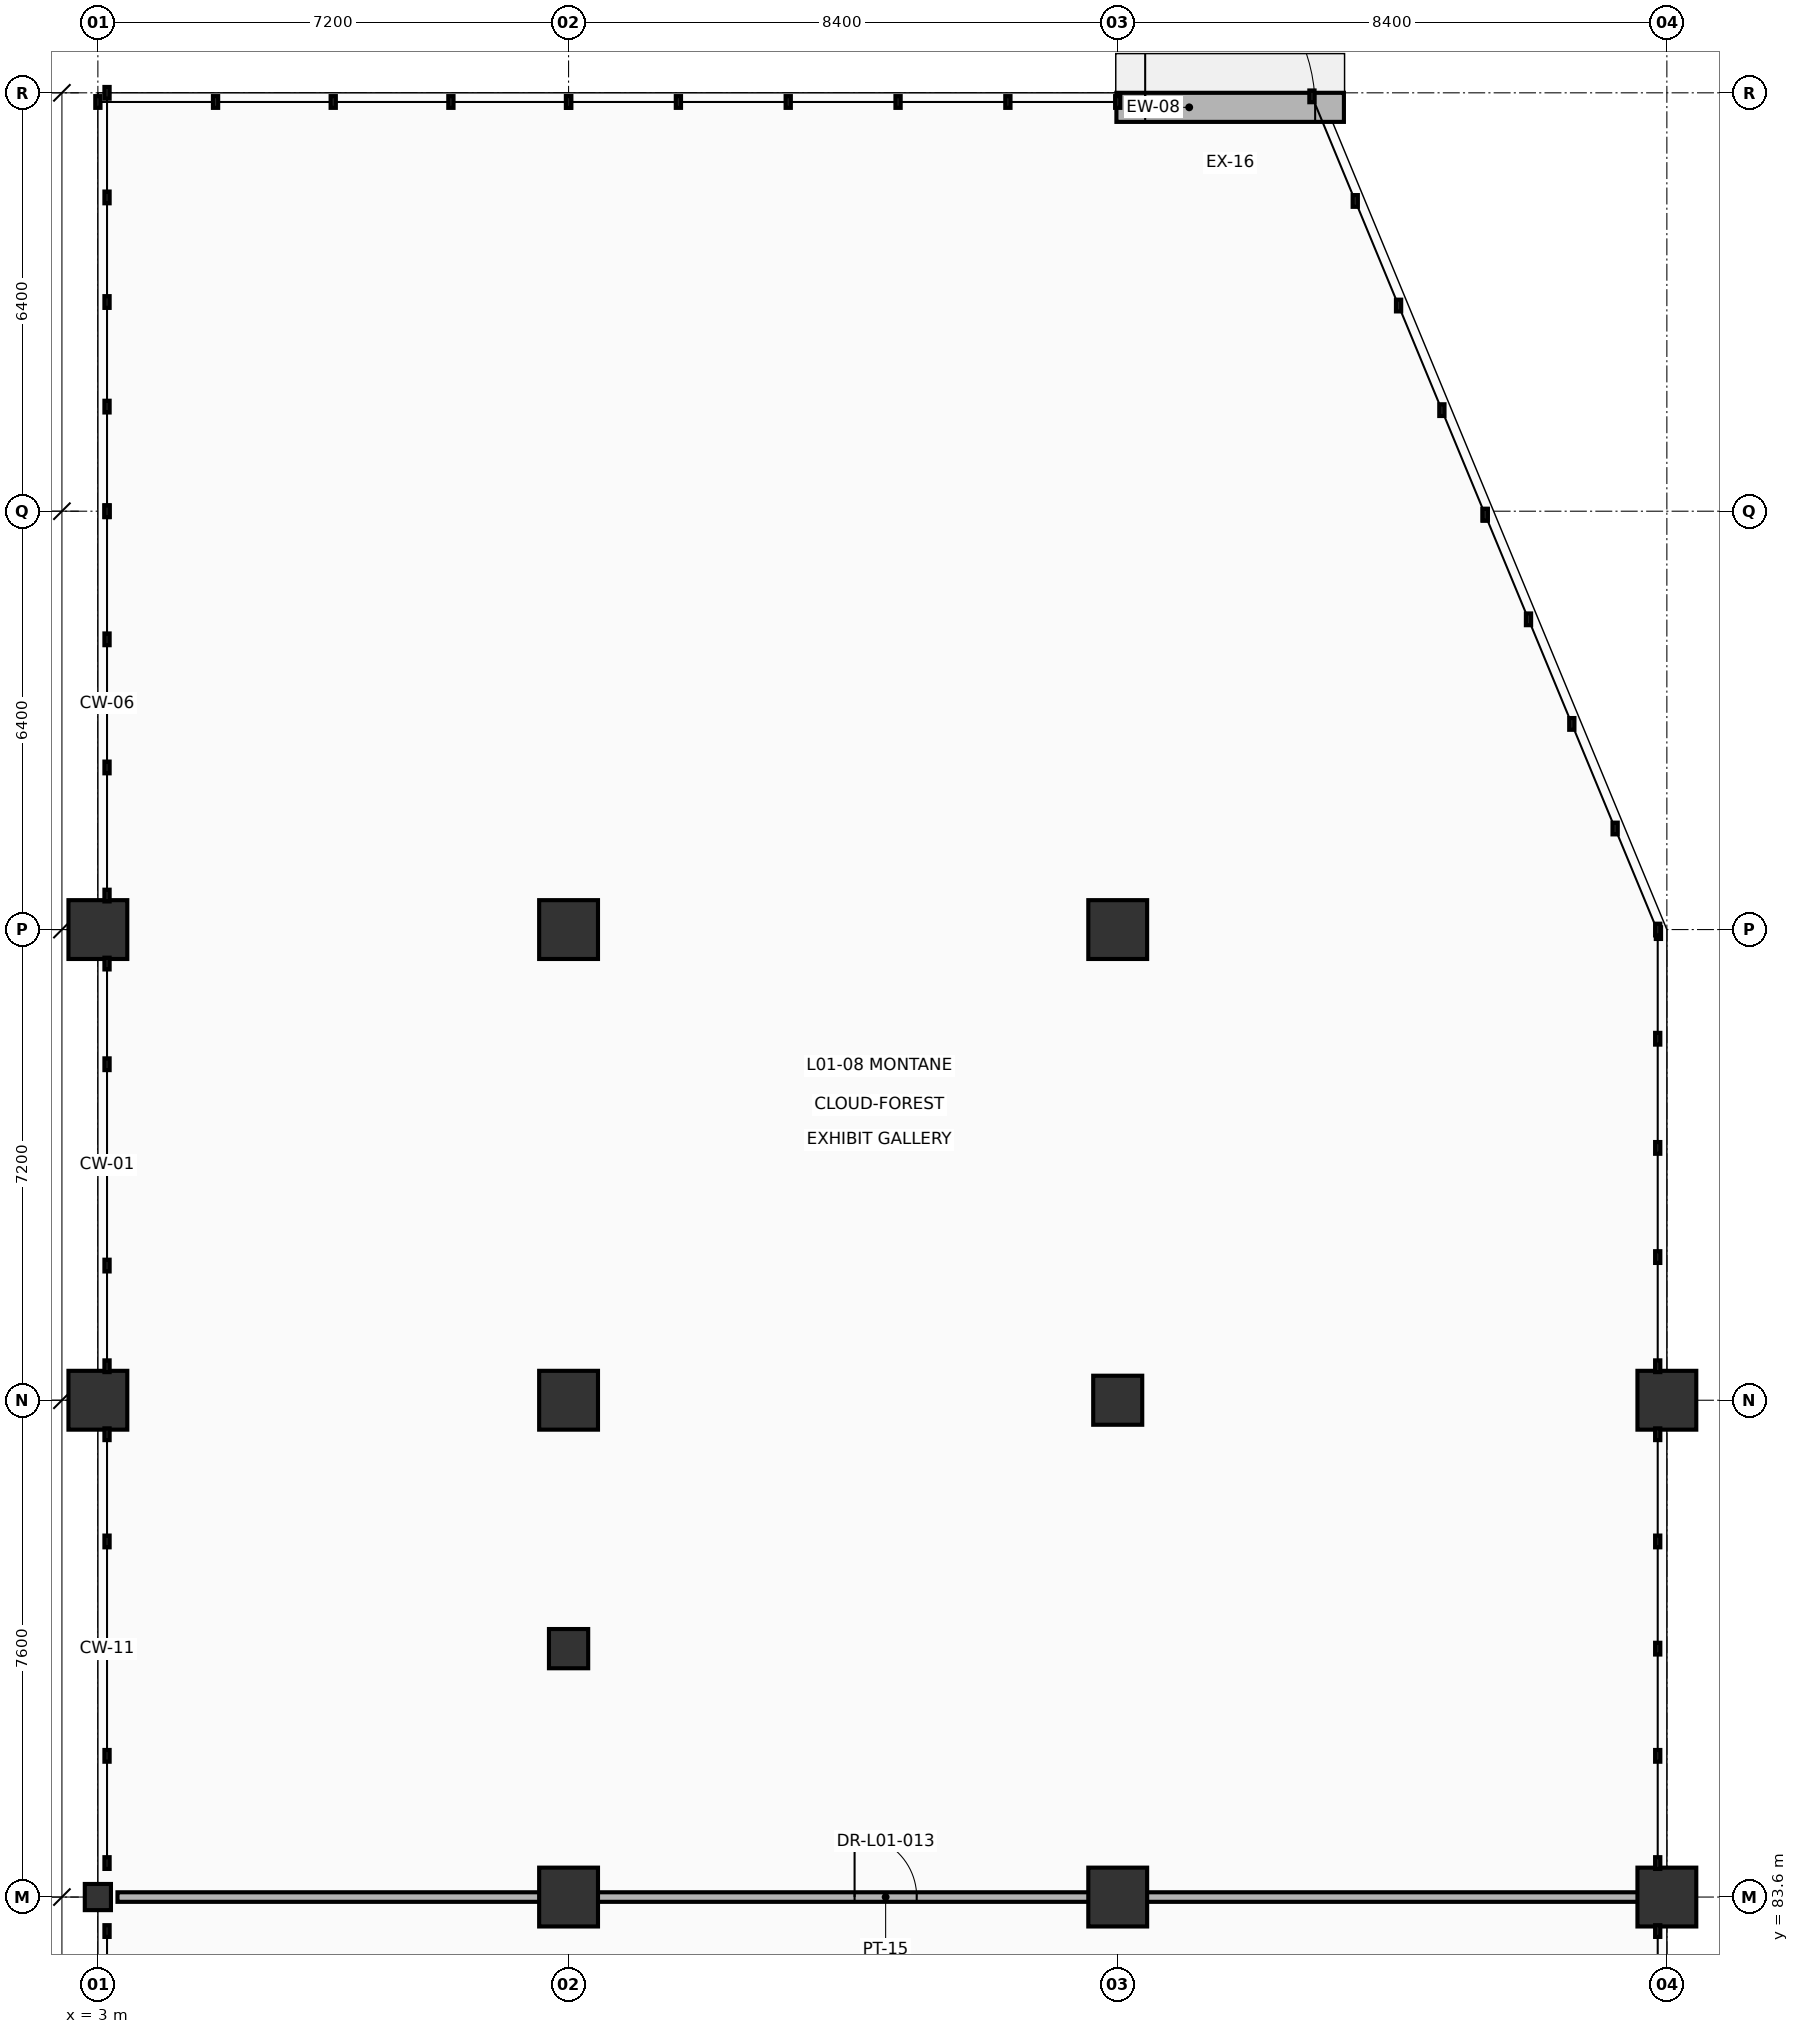
"""IFC4 building model, lengths in metres.
Left out: names, types, materials, properties, quantities, classifications, styles, units other than length and angle.
Written with IfcOpenShell. Run it as: python <this file> out.ifc"""

import sys

from ifc_helpers import new_model, si_unit, direction, frame, frame_2d, origin, origin_2d, place, context, subcontext, project, spatial, rectangle, hollow_rectangle, circle, extrude, element, fill, save


model = new_model("IFC4")
c1 = context("Model", 3, precision=1e-05, world=origin(), true_north=direction((0.0, 1.0)))
c2 = subcontext(c1, "Body", "Model", "MODEL_VIEW")
j1 = project(units=[si_unit("LENGTHUNIT", "METRE"), si_unit("PLANEANGLEUNIT", "RADIAN")], contexts=[c1])
p1 = place(None, origin())
s1 = spatial("IfcSite", under=j1, at=p1, CompositionType="ELEMENT")
p2 = place(p1, origin())
s2 = spatial("IfcBuilding", under=s1, at=p2, CompositionType="ELEMENT")
p3 = place(p2, origin())
s3 = spatial("IfcBuildingStorey", under=s2, at=p3, CompositionType="ELEMENT", Elevation=0.0)
p4 = place(p3, frame((3.0, 83.6, 0.0), z_axis=(0.0, 0.0, 1.0), x_axis=(1.0, 0.0, 0.0)))
e1 = element("IfcColumn", 1, at=p4, inside=s3, PredefinedType="COLUMN", context=c2, shape_type="SweptSolid", body=[
    extrude(hollow_rectangle(XDim=0.4, YDim=0.4, WallThickness=0.016, at=origin_2d()), origin(), (0.0, 0.0, 1.0), 5.4),
])
p5 = place(p3, frame((3.0, 91.2, 0.0), z_axis=(0.0, 0.0, 1.0), x_axis=(1.0, 0.0, 0.0)))
e2 = element("IfcColumn", 2, at=p5, inside=s3, PredefinedType="COLUMN", context=c2, shape_type="SweptSolid", body=[
    extrude(rectangle(XDim=0.9, YDim=0.9, at=origin_2d()), origin(), (0.0, 0.0, 1.0), 5.4),
])
p6 = place(p3, frame((3.0, 98.4, 0.0), z_axis=(0.0, 0.0, 1.0), x_axis=(1.0, 0.0, 0.0)))
e3 = element("IfcColumn", 3, at=p6, inside=s3, PredefinedType="COLUMN", context=c2, shape_type="SweptSolid", body=[
    extrude(rectangle(XDim=0.9, YDim=0.9, at=origin_2d()), origin(), (0.0, 0.0, 1.0), 5.16),
])
for number, where, z_axis, x_axis in (
    (4, (10.2, 83.6, 0.0), (0.0, 0.0, 1.0), (1.0, 0.0, 0.0)),
    (5, (10.2, 91.2, 0.0), (0.0, 0.0, 1.0), (1.0, 0.0, 0.0)),
):
    element("IfcColumn", number, at=place(p3, frame(where, z_axis=z_axis, x_axis=x_axis)), inside=s3, PredefinedType="COLUMN", context=c2, shape_type="SweptSolid", body=[
        extrude(rectangle(XDim=0.9, YDim=0.9, at=origin_2d()), origin(), (0.0, 0.0, 1.0), 5.4),
    ])
p7 = place(p3, frame((10.2, 98.4, 0.0), z_axis=(0.0, 0.0, 1.0), x_axis=(1.0, 0.0, 0.0)))
e6 = element("IfcColumn", 6, at=p7, inside=s3, PredefinedType="COLUMN", context=c2, shape_type="SweptSolid", body=[
    extrude(rectangle(XDim=0.9, YDim=0.9, at=origin_2d()), origin(), (0.0, 0.0, 1.0), 5.16),
])
p8 = place(p3, frame((18.6, 83.6, 0.0), z_axis=(0.0, 0.0, 1.0), x_axis=(1.0, 0.0, 0.0)))
e7 = element("IfcColumn", 7, at=p8, inside=s3, PredefinedType="COLUMN", context=c2, shape_type="SweptSolid", body=[
    extrude(rectangle(XDim=0.9, YDim=0.9, at=origin_2d()), origin(), (0.0, 0.0, 1.0), 5.4),
])
p9 = place(p3, frame((18.6, 91.2, 0.0), z_axis=(0.0, 0.0, 1.0), x_axis=(1.0, 0.0, 0.0)))
e8 = element("IfcColumn", 8, at=p9, inside=s3, PredefinedType="COLUMN", context=c2, shape_type="SweptSolid", body=[
    extrude(circle(Radius=0.375, at=origin_2d()), origin(), (0.0, 0.0, 1.0), 5.16),
])
p10 = place(p3, frame((18.6, 98.4, 0.0), z_axis=(0.0, 0.0, 1.0), x_axis=(1.0, 0.0, 0.0)))
e9 = element("IfcColumn", 9, at=p10, inside=s3, PredefinedType="COLUMN", context=c2, shape_type="SweptSolid", body=[
    extrude(rectangle(XDim=0.9, YDim=0.9, at=origin_2d()), origin(), (0.0, 0.0, 1.0), 5.16),
])
p11 = place(p3, frame((27.0, 83.6, 0.0), z_axis=(0.0, 0.0, 1.0), x_axis=(1.0, 0.0, 0.0)))
e10 = element("IfcColumn", 10, at=p11, inside=s3, PredefinedType="COLUMN", context=c2, shape_type="SweptSolid", body=[
    extrude(rectangle(XDim=0.9, YDim=0.9, at=origin_2d()), origin(), (0.0, 0.0, 1.0), 5.4),
])
p12 = place(p3, frame((27.0, 91.2, 0.0), z_axis=(0.0, 0.0, 1.0), x_axis=(1.0, 0.0, 0.0)))
e11 = element("IfcColumn", 11, at=p12, inside=s3, PredefinedType="COLUMN", context=c2, shape_type="SweptSolid", body=[
    extrude(rectangle(XDim=0.9, YDim=0.9, at=origin_2d()), origin(), (0.0, 0.0, 1.0), 5.16),
])
p13 = place(p3, frame((10.2, 87.4, 0.0), z_axis=(0.0, 0.0, 1.0), x_axis=(1.0, 0.0, 0.0)))
e12 = element("IfcColumn", 12, at=p13, inside=s3, PredefinedType="COLUMN", context=c2, shape_type="SweptSolid", body=[
    extrude(rectangle(XDim=0.6, YDim=0.6, at=origin_2d()), origin(), (0.0, 0.0, 1.0), 5.4),
])
p14 = place(p3, frame((18.58, 110.978, 0.0), z_axis=(0.0, 0.0, 1.0), x_axis=(1.0, 0.0, 0.0)))
e13 = element("IfcWall", 13, at=p14, inside=s3, PredefinedType="SOLIDWALL", context=c2, shape_type="SweptSolid", body=[
    extrude(rectangle(XDim=3.48, YDim=0.445, at=frame_2d((1.74, 0.0))), origin(), (0.0, 0.0, 1.0), 5.16),
])
p15 = place(p14, frame((0.44, 0.0, 0.0)))
e14 = element("IfcOpeningElement", 14, at=p15, cuts=e13, PredefinedType="OPENING", context=c2, shape_type="SweptSolid", body=[
    extrude(rectangle(XDim=2.6, YDim=2.6, at=frame_2d((1.3, 1.3))), frame((0.0, 0.232, 0.0), z_axis=(0.0, -1.0, 0.0), x_axis=(1.0, 0.0, 0.0)), (0.0, 0.0, 1.0), 0.465),
])
p16 = place(p3, frame((3.3, 83.6, 0.0), z_axis=(0.0, 0.0, 1.0), x_axis=(1.0, 0.0, 0.0)))
e15 = element("IfcWall", 15, at=p16, inside=s3, PredefinedType="PARTITIONING", context=c2, shape_type="SweptSolid", body=[
    extrude(rectangle(XDim=23.5, YDim=0.146, at=frame_2d((11.75, 0.0))), origin(), (0.0, 0.0, 1.0), 4.385),
])
p17 = place(p16, frame((11.275, 0.0, 0.0)))
e16 = element("IfcOpeningElement", 16, at=p17, cuts=e15, PredefinedType="OPENING", context=c2, shape_type="SweptSolid", body=[
    extrude(rectangle(XDim=0.95, YDim=2.1, at=frame_2d((0.475, 1.05))), frame((0.0, 0.083, 0.0), z_axis=(0.0, -1.0, 0.0), x_axis=(1.0, 0.0, 0.0)), (0.0, 0.0, 1.0), 0.166),
])
p18 = place(p15, origin())
e17 = element("IfcDoor", 17, at=p18, inside=s3, OperationType="DOUBLE_DOOR_SINGLE_SWING", PredefinedType="DOOR", context=c2, shape_type="SweptSolid", body=[
    extrude(rectangle(XDim=2.6, YDim=2.6, at=frame_2d((1.3, 1.3))), frame((0.0, 0.025, 0.0), z_axis=(0.0, -1.0, 0.0), x_axis=(1.0, 0.0, 0.0)), (0.0, 0.0, 1.0), 0.05),
])
fill(e14, e17)
p19 = place(p17, origin())
e18 = element("IfcDoor", 18, at=p19, inside=s3, OperationType="SINGLE_SWING_LEFT", PredefinedType="DOOR", context=c2, shape_type="SweptSolid", body=[
    extrude(rectangle(XDim=0.95, YDim=2.1, at=frame_2d((0.475, 1.05))), frame((0.0, 0.025, 0.0), z_axis=(0.0, -1.0, 0.0), x_axis=(1.0, 0.0, 0.0)), (0.0, 0.0, 1.0), 0.05),
])
fill(e16, e18)
save(model, sys.argv[1])
